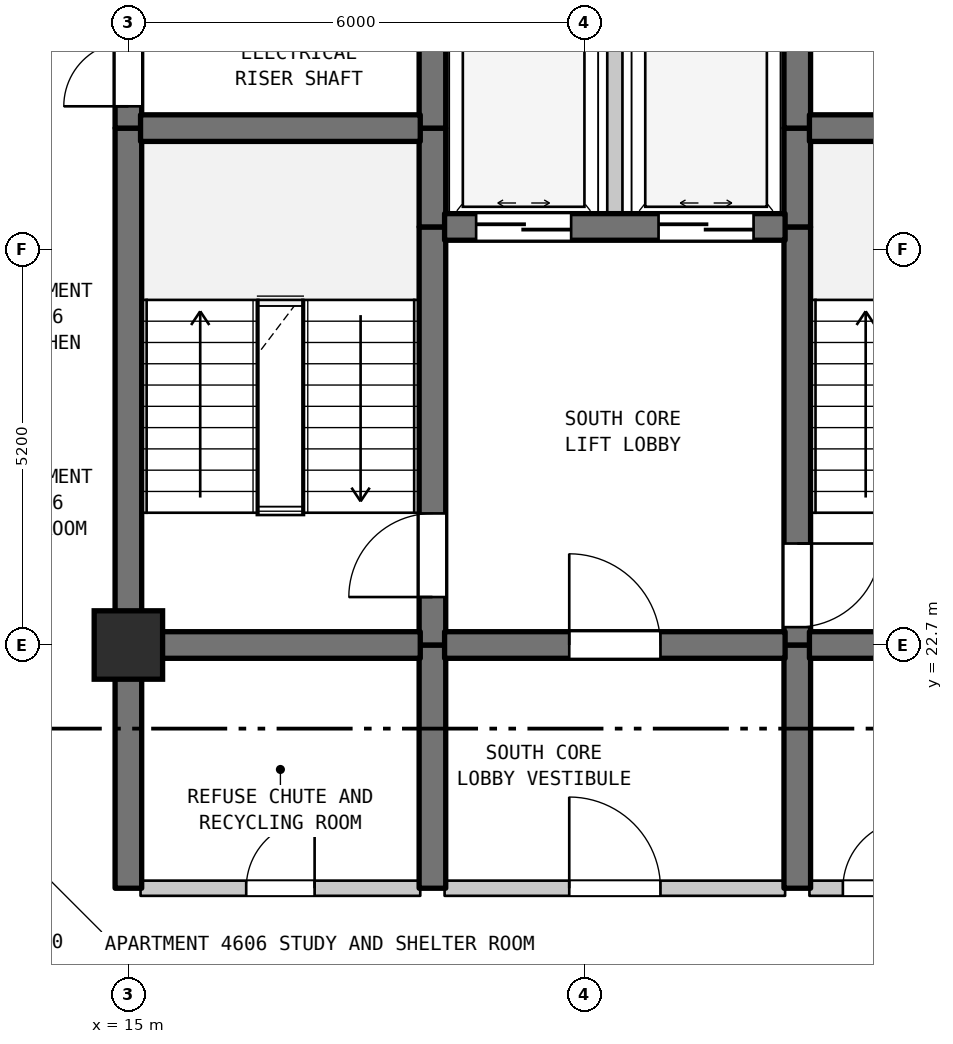
"""IFC4 building model, lengths in metres.
Left out: names, types, materials, properties, quantities, classifications, styles, units other than length and angle.
Written with IfcOpenShell. Run it as: python <this file> out.ifc"""

import sys

from ifc_helpers import new_model, si_unit, direction, frame, frame_2d, origin, origin_2d, place, context, subcontext, project, spatial, rectangle, extrude, element, fill, save


model = new_model("IFC4")
c1 = context("Model", 3, precision=1e-05, world=origin(), true_north=direction((0.0, 1.0)))
c2 = subcontext(c1, "Body", "Model", "MODEL_VIEW")
j1 = project(units=[si_unit("LENGTHUNIT", "METRE"), si_unit("PLANEANGLEUNIT", "RADIAN")], contexts=[c1])
p1 = place(None, origin())
s1 = spatial("IfcSite", under=j1, at=p1, CompositionType="ELEMENT")
p2 = place(p1, origin())
s2 = spatial("IfcBuilding", under=s1, at=p2, CompositionType="ELEMENT")
p3 = place(p2, frame((0.0, 0.0, 188.4)))
s3 = spatial("IfcBuildingStorey", under=s2, at=p3, CompositionType="ELEMENT", Elevation=188.4)
p4 = place(p3, frame((15.0, 22.7, 0.0), z_axis=(0.0, 0.0, 1.0), x_axis=(1.0, 0.0, 0.0)))
e1 = element("IfcColumn", 1, at=p4, inside=s3, PredefinedType="COLUMN", context=c2, shape_type="SweptSolid", body=[
    extrude(rectangle(XDim=0.9, YDim=0.9, at=origin_2d()), origin(), (0.0, 0.0, 1.0), 3.7),
])
p5 = place(p3, frame((15.0, 19.5, 0.0), z_axis=(0.0, 0.0, 1.0), x_axis=(0.0, 1.0, 0.0)))
e2 = element("IfcWall", 2, at=p5, inside=s3, PredefinedType="SHEAR", context=c2, shape_type="SweptSolid", body=[
    extrude(rectangle(XDim=3.2, YDim=0.35, at=frame_2d((1.6, 0.0))), origin(), (0.0, 0.0, 1.0), 3.39),
])
p6 = place(p3, frame((15.0, 22.7, 0.0), z_axis=(0.0, 0.0, 1.0), x_axis=(0.0, 1.0, 0.0)))
e3 = element("IfcWall", 3, at=p6, inside=s3, PredefinedType="SHEAR", context=c2, shape_type="SweptSolid", body=[
    extrude(rectangle(XDim=6.8, YDim=0.35, at=frame_2d((3.4, 0.0))), origin(), (0.0, 0.0, 1.0), 3.39),
])
p7 = place(p3, frame((15.0, 29.5, 0.0), z_axis=(0.0, 0.0, 1.0), x_axis=(0.0, 1.0, 0.0)))
e4 = element("IfcWall", 4, at=p7, inside=s3, PredefinedType="SHEAR", context=c2, shape_type="SweptSolid", body=[
    extrude(rectangle(XDim=1.6, YDim=0.35, at=frame_2d((0.8, 0.0))), origin(), (0.0, 0.0, 1.0), 3.39),
])
p8 = place(p7, frame((0.287, 0.0, 0.0)))
e5 = element("IfcOpeningElement", 5, at=p8, cuts=e4, PredefinedType="OPENING", context=c2, shape_type="SweptSolid", body=[
    extrude(rectangle(XDim=0.85, YDim=2.1, at=frame_2d((0.425, 1.05))), frame((0.0, 0.185, 0.0), z_axis=(0.0, -1.0, 0.0), x_axis=(1.0, 0.0, 0.0)), (0.0, 0.0, 1.0), 0.37),
])
p9 = place(p3, frame((19.0, 19.5, 0.0), z_axis=(0.0, 0.0, 1.0), x_axis=(0.0, 1.0, 0.0)))
e6 = element("IfcWall", 6, at=p9, inside=s3, PredefinedType="SHEAR", context=c2, shape_type="SweptSolid", body=[
    extrude(rectangle(XDim=3.2, YDim=0.35, at=frame_2d((1.6, 0.0))), origin(), (0.0, 0.0, 1.0), 3.39),
])
p10 = place(p3, frame((19.0, 22.7, 0.0), z_axis=(0.0, 0.0, 1.0), x_axis=(0.0, 1.0, 0.0)))
e7 = element("IfcWall", 7, at=p10, inside=s3, PredefinedType="SHEAR", context=c2, shape_type="SweptSolid", body=[
    extrude(rectangle(XDim=5.5, YDim=0.35, at=frame_2d((2.75, 0.0))), origin(), (0.0, 0.0, 1.0), 3.39),
])
p11 = place(p10, frame((0.631, 0.0, 0.0)))
e8 = element("IfcOpeningElement", 8, at=p11, cuts=e7, PredefinedType="OPENING", context=c2, shape_type="SweptSolid", body=[
    extrude(rectangle(XDim=1.1, YDim=2.15, at=frame_2d((0.55, 1.075))), frame((0.0, 0.185, 0.0), z_axis=(0.0, -1.0, 0.0), x_axis=(1.0, 0.0, 0.0)), (0.0, 0.0, 1.0), 0.37),
])
p12 = place(p3, frame((19.0, 28.2, 0.0), z_axis=(0.0, 0.0, 1.0), x_axis=(0.0, 1.0, 0.0)))
e9 = element("IfcWall", 9, at=p12, inside=s3, PredefinedType="SHEAR", context=c2, shape_type="SweptSolid", body=[
    extrude(rectangle(XDim=1.3, YDim=0.35, at=frame_2d((0.65, 0.0))), origin(), (0.0, 0.0, 1.0), 3.39),
])
p13 = place(p3, frame((19.0, 29.5, 0.0), z_axis=(0.0, 0.0, 1.0), x_axis=(0.0, 1.0, 0.0)))
e10 = element("IfcWall", 10, at=p13, inside=s3, PredefinedType="SHEAR", context=c2, shape_type="SweptSolid", body=[
    extrude(rectangle(XDim=5.5, YDim=0.35, at=frame_2d((2.75, 0.0))), origin(), (0.0, 0.0, 1.0), 3.39),
])
p14 = place(p13, frame((2.025, 0.0, 0.0)))
e11 = element("IfcOpeningElement", 11, at=p14, cuts=e10, PredefinedType="OPENING", context=c2, shape_type="SweptSolid", body=[
    extrude(rectangle(XDim=1.1, YDim=2.15, at=frame_2d((0.55, 1.075))), frame((0.0, 0.185, 0.0), z_axis=(0.0, -1.0, 0.0), x_axis=(1.0, 0.0, 0.0)), (0.0, 0.0, 1.0), 0.37),
])
p15 = place(p3, frame((21.4, 28.2, 0.0), z_axis=(0.0, 0.0, 1.0), x_axis=(0.0, 1.0, 0.0)))
e12 = element("IfcWall", 12, at=p15, inside=s3, PredefinedType="STANDARD", context=c2, shape_type="SweptSolid", body=[
    extrude(rectangle(XDim=2.6, YDim=0.2, at=frame_2d((1.3, 0.0))), origin(), (0.0, 0.0, 1.0), 3.39),
])
p16 = place(p3, frame((23.8, 19.5, 0.0), z_axis=(0.0, 0.0, 1.0), x_axis=(0.0, 1.0, 0.0)))
e13 = element("IfcWall", 13, at=p16, inside=s3, PredefinedType="SHEAR", context=c2, shape_type="SweptSolid", body=[
    extrude(rectangle(XDim=3.2, YDim=0.35, at=frame_2d((1.6, 0.0))), origin(), (0.0, 0.0, 1.0), 3.39),
])
p17 = place(p3, frame((23.8, 22.7, 0.0), z_axis=(0.0, 0.0, 1.0), x_axis=(0.0, 1.0, 0.0)))
e14 = element("IfcWall", 14, at=p17, inside=s3, PredefinedType="SHEAR", context=c2, shape_type="SweptSolid", body=[
    extrude(rectangle(XDim=5.5, YDim=0.35, at=frame_2d((2.75, 0.0))), origin(), (0.0, 0.0, 1.0), 3.39),
])
p18 = place(p17, frame((0.235, 0.0, 0.0)))
e15 = element("IfcOpeningElement", 15, at=p18, cuts=e14, PredefinedType="OPENING", context=c2, shape_type="SweptSolid", body=[
    extrude(rectangle(XDim=1.1, YDim=2.15, at=frame_2d((0.55, 1.075))), frame((0.0, 0.185, 0.0), z_axis=(0.0, -1.0, 0.0), x_axis=(1.0, 0.0, 0.0)), (0.0, 0.0, 1.0), 0.37),
])
for number, where, z_axis, x_axis in (
    (16, (23.8, 28.2, 0.0), (0.0, 0.0, 1.0), (0.0, 1.0, 0.0)),
    (17, (23.8, 29.5, 0.0), (0.0, 0.0, 1.0), (0.0, 1.0, 0.0)),
):
    element("IfcWall", number, at=place(p3, frame(where, z_axis=z_axis, x_axis=x_axis)), inside=s3, PredefinedType="SHEAR", context=c2, shape_type="SweptSolid", body=[
        extrude(rectangle(XDim=1.3, YDim=0.35, at=frame_2d((0.65, 0.0))), origin(), (0.0, 0.0, 1.0), 3.39),
    ])
p19 = place(p3, frame((15.16, 19.5, 0.0), z_axis=(0.0, 0.0, 1.0), x_axis=(1.0, 0.0, 0.0)))
e18 = element("IfcWall", 18, at=p19, inside=s3, PredefinedType="STANDARD", context=c2, shape_type="SweptSolid", body=[
    extrude(rectangle(XDim=3.68, YDim=0.2, at=frame_2d((1.84, 0.0))), origin(), (0.0, 0.0, 1.0), 3.39),
])
p20 = place(p19, frame((1.39, 0.0, 0.0)))
e19 = element("IfcOpeningElement", 19, at=p20, cuts=e18, PredefinedType="OPENING", context=c2, shape_type="SweptSolid", body=[
    extrude(rectangle(XDim=0.9, YDim=2.15, at=frame_2d((0.45, 1.075))), frame((0.0, 0.11, 0.0), z_axis=(0.0, -1.0, 0.0), x_axis=(1.0, 0.0, 0.0)), (0.0, 0.0, 1.0), 0.22),
])
p21 = place(p3, frame((19.16, 19.5, 0.0), z_axis=(0.0, 0.0, 1.0), x_axis=(1.0, 0.0, 0.0)))
e20 = element("IfcWall", 20, at=p21, inside=s3, PredefinedType="STANDARD", context=c2, shape_type="SweptSolid", body=[
    extrude(rectangle(XDim=4.48, YDim=0.2, at=frame_2d((2.24, 0.0))), origin(), (0.0, 0.0, 1.0), 3.39),
])
p22 = place(p21, frame((1.64, 0.0, 0.0)))
e21 = element("IfcOpeningElement", 21, at=p22, cuts=e20, PredefinedType="OPENING", context=c2, shape_type="SweptSolid", body=[
    extrude(rectangle(XDim=1.2, YDim=2.2, at=frame_2d((0.6, 1.1))), frame((0.0, 0.11, 0.0), z_axis=(0.0, -1.0, 0.0), x_axis=(1.0, 0.0, 0.0)), (0.0, 0.0, 1.0), 0.22),
])
p23 = place(p3, frame((23.96, 19.5, 0.0), z_axis=(0.0, 0.0, 1.0), x_axis=(1.0, 0.0, 0.0)))
e22 = element("IfcWall", 22, at=p23, inside=s3, PredefinedType="STANDARD", context=c2, shape_type="SweptSolid", body=[
    extrude(rectangle(XDim=1.855, YDim=0.2, at=frame_2d((0.927, 0.0))), origin(), (0.0, 0.0, 1.0), 3.39),
])
p24 = place(p23, frame((0.44, 0.0, 0.0)))
e23 = element("IfcOpeningElement", 23, at=p24, cuts=e22, PredefinedType="OPENING", context=c2, shape_type="SweptSolid", body=[
    extrude(rectangle(XDim=0.9, YDim=2.15, at=frame_2d((0.45, 1.075))), frame((0.0, 0.11, 0.0), z_axis=(0.0, -1.0, 0.0), x_axis=(1.0, 0.0, 0.0)), (0.0, 0.0, 1.0), 0.22),
])
p25 = place(p3, frame((15.16, 22.7, 0.0), z_axis=(0.0, 0.0, 1.0), x_axis=(1.0, 0.0, 0.0)))
e24 = element("IfcWall", 24, at=p25, inside=s3, PredefinedType="SHEAR", context=c2, shape_type="SweptSolid", body=[
    extrude(rectangle(XDim=3.68, YDim=0.35, at=frame_2d((1.84, 0.0))), origin(), (0.0, 0.0, 1.0), 3.39),
])
p26 = place(p3, frame((19.16, 22.7, 0.0), z_axis=(0.0, 0.0, 1.0), x_axis=(1.0, 0.0, 0.0)))
e25 = element("IfcWall", 25, at=p26, inside=s3, PredefinedType="SHEAR", context=c2, shape_type="SweptSolid", body=[
    extrude(rectangle(XDim=4.48, YDim=0.35, at=frame_2d((2.24, 0.0))), origin(), (0.0, 0.0, 1.0), 3.39),
])
p27 = place(p26, frame((1.64, 0.0, 0.0)))
e26 = element("IfcOpeningElement", 26, at=p27, cuts=e25, PredefinedType="OPENING", context=c2, shape_type="SweptSolid", body=[
    extrude(rectangle(XDim=1.2, YDim=2.2, at=frame_2d((0.6, 1.1))), frame((0.0, 0.185, 0.0), z_axis=(0.0, -1.0, 0.0), x_axis=(1.0, 0.0, 0.0)), (0.0, 0.0, 1.0), 0.37),
])
p28 = place(p3, frame((23.96, 22.7, 0.0), z_axis=(0.0, 0.0, 1.0), x_axis=(1.0, 0.0, 0.0)))
e27 = element("IfcWall", 27, at=p28, inside=s3, PredefinedType="SHEAR", context=c2, shape_type="SweptSolid", body=[
    extrude(rectangle(XDim=1.855, YDim=0.35, at=frame_2d((0.927, 0.0))), origin(), (0.0, 0.0, 1.0), 3.39),
])
p29 = place(p3, frame((19.16, 28.2, 0.0), z_axis=(0.0, 0.0, 1.0), x_axis=(1.0, 0.0, 0.0)))
e28 = element("IfcWall", 28, at=p29, inside=s3, PredefinedType="SHEAR", context=c2, shape_type="SweptSolid", body=[
    extrude(rectangle(XDim=4.48, YDim=0.35, at=frame_2d((2.24, 0.0))), origin(), (0.0, 0.0, 1.0), 3.39),
])
p30 = place(p29, frame((0.415, 0.0, 0.0)))
e29 = element("IfcOpeningElement", 29, at=p30, cuts=e28, PredefinedType="OPENING", context=c2, shape_type="SweptSolid", body=[
    extrude(rectangle(XDim=1.25, YDim=2.2, at=frame_2d((0.625, 1.1))), frame((0.0, 0.185, 0.0), z_axis=(0.0, -1.0, 0.0), x_axis=(1.0, 0.0, 0.0)), (0.0, 0.0, 1.0), 0.37),
])
p31 = place(p29, frame((2.815, 0.0, 0.0)))
e30 = element("IfcOpeningElement", 30, at=p31, cuts=e28, PredefinedType="OPENING", context=c2, shape_type="SweptSolid", body=[
    extrude(rectangle(XDim=1.25, YDim=2.2, at=frame_2d((0.625, 1.1))), frame((0.0, 0.185, 0.0), z_axis=(0.0, -1.0, 0.0), x_axis=(1.0, 0.0, 0.0)), (0.0, 0.0, 1.0), 0.37),
])
p32 = place(p3, frame((15.16, 29.5, 0.0), z_axis=(0.0, 0.0, 1.0), x_axis=(1.0, 0.0, 0.0)))
e31 = element("IfcWall", 31, at=p32, inside=s3, PredefinedType="SHEAR", context=c2, shape_type="SweptSolid", body=[
    extrude(rectangle(XDim=3.68, YDim=0.35, at=frame_2d((1.84, 0.0))), origin(), (0.0, 0.0, 1.0), 3.39),
])
p33 = place(p3, frame((23.96, 29.5, 0.0), z_axis=(0.0, 0.0, 1.0), x_axis=(1.0, 0.0, 0.0)))
e32 = element("IfcWall", 32, at=p33, inside=s3, PredefinedType="SHEAR", context=c2, shape_type="SweptSolid", body=[
    extrude(rectangle(XDim=3.18, YDim=0.35, at=frame_2d((1.59, 0.0))), origin(), (0.0, 0.0, 1.0), 3.39),
])
p34 = place(p8, origin())
e33 = element("IfcDoor", 33, at=p34, inside=s3, OperationType="SINGLE_SWING_LEFT", PredefinedType="DOOR", context=c2, shape_type="SweptSolid", body=[
    extrude(rectangle(XDim=0.85, YDim=2.1, at=frame_2d((0.425, 1.05))), frame((0.0, 0.025, 0.0), z_axis=(0.0, -1.0, 0.0), x_axis=(1.0, 0.0, 0.0)), (0.0, 0.0, 1.0), 0.05),
])
fill(e5, e33)
p35 = place(p11, origin())
e34 = element("IfcDoor", 34, at=p35, inside=s3, OperationType="SINGLE_SWING_LEFT", PredefinedType="DOOR", context=c2, shape_type="SweptSolid", body=[
    extrude(rectangle(XDim=1.1, YDim=2.15, at=frame_2d((0.55, 1.075))), frame((0.0, 0.025, 0.0), z_axis=(0.0, -1.0, 0.0), x_axis=(1.0, 0.0, 0.0)), (0.0, 0.0, 1.0), 0.05),
])
fill(e8, e34)
p36 = place(p18, frame((1.1, 0.0, 0.0), z_axis=(0.0, 0.0, 1.0), x_axis=(-1.0, 0.0, 0.0)))
e35 = element("IfcDoor", 35, at=p36, inside=s3, OperationType="SINGLE_SWING_RIGHT", PredefinedType="DOOR", context=c2, shape_type="SweptSolid", body=[
    extrude(rectangle(XDim=1.1, YDim=2.15, at=frame_2d((0.55, 1.075))), frame((0.0, 0.025, 0.0), z_axis=(0.0, -1.0, 0.0), x_axis=(1.0, 0.0, 0.0)), (0.0, 0.0, 1.0), 0.05),
])
fill(e15, e35)
p37 = place(p20, origin())
e36 = element("IfcDoor", 36, at=p37, inside=s3, OperationType="SINGLE_SWING_RIGHT", PredefinedType="DOOR", context=c2, shape_type="SweptSolid", body=[
    extrude(rectangle(XDim=0.9, YDim=2.15, at=frame_2d((0.45, 1.075))), frame((0.0, 0.025, 0.0), z_axis=(0.0, -1.0, 0.0), x_axis=(1.0, 0.0, 0.0)), (0.0, 0.0, 1.0), 0.05),
])
fill(e19, e36)
p38 = place(p22, origin())
e37 = element("IfcDoor", 37, at=p38, inside=s3, OperationType="SINGLE_SWING_LEFT", PredefinedType="DOOR", context=c2, shape_type="SweptSolid", body=[
    extrude(rectangle(XDim=1.2, YDim=2.2, at=frame_2d((0.6, 1.1))), frame((0.0, 0.025, 0.0), z_axis=(0.0, -1.0, 0.0), x_axis=(1.0, 0.0, 0.0)), (0.0, 0.0, 1.0), 0.05),
])
fill(e21, e37)
p39 = place(p24, origin())
e38 = element("IfcDoor", 38, at=p39, inside=s3, OperationType="SINGLE_SWING_RIGHT", PredefinedType="DOOR", context=c2, shape_type="SweptSolid", body=[
    extrude(rectangle(XDim=0.9, YDim=2.15, at=frame_2d((0.45, 1.075))), frame((0.0, 0.025, 0.0), z_axis=(0.0, -1.0, 0.0), x_axis=(1.0, 0.0, 0.0)), (0.0, 0.0, 1.0), 0.05),
])
fill(e23, e38)
p40 = place(p27, origin())
e39 = element("IfcDoor", 39, at=p40, inside=s3, OperationType="SINGLE_SWING_LEFT", PredefinedType="DOOR", context=c2, shape_type="SweptSolid", body=[
    extrude(rectangle(XDim=1.2, YDim=2.2, at=frame_2d((0.6, 1.1))), frame((0.0, 0.025, 0.0), z_axis=(0.0, -1.0, 0.0), x_axis=(1.0, 0.0, 0.0)), (0.0, 0.0, 1.0), 0.05),
])
fill(e26, e39)
p41 = place(p30, origin())
e40 = element("IfcDoor", 40, at=p41, inside=s3, OperationType="DOUBLE_DOOR_SLIDING", PredefinedType="DOOR", context=c2, shape_type="SweptSolid", body=[
    extrude(rectangle(XDim=1.25, YDim=2.2, at=frame_2d((0.625, 1.1))), frame((0.0, 0.025, 0.0), z_axis=(0.0, -1.0, 0.0), x_axis=(1.0, 0.0, 0.0)), (0.0, 0.0, 1.0), 0.05),
])
fill(e29, e40)
p42 = place(p31, origin())
e41 = element("IfcDoor", 41, at=p42, inside=s3, OperationType="DOUBLE_DOOR_SLIDING", PredefinedType="DOOR", context=c2, shape_type="SweptSolid", body=[
    extrude(rectangle(XDim=1.25, YDim=2.2, at=frame_2d((0.625, 1.1))), frame((0.0, 0.025, 0.0), z_axis=(0.0, -1.0, 0.0), x_axis=(1.0, 0.0, 0.0)), (0.0, 0.0, 1.0), 0.05),
])
fill(e30, e41)
save(model, sys.argv[1])
